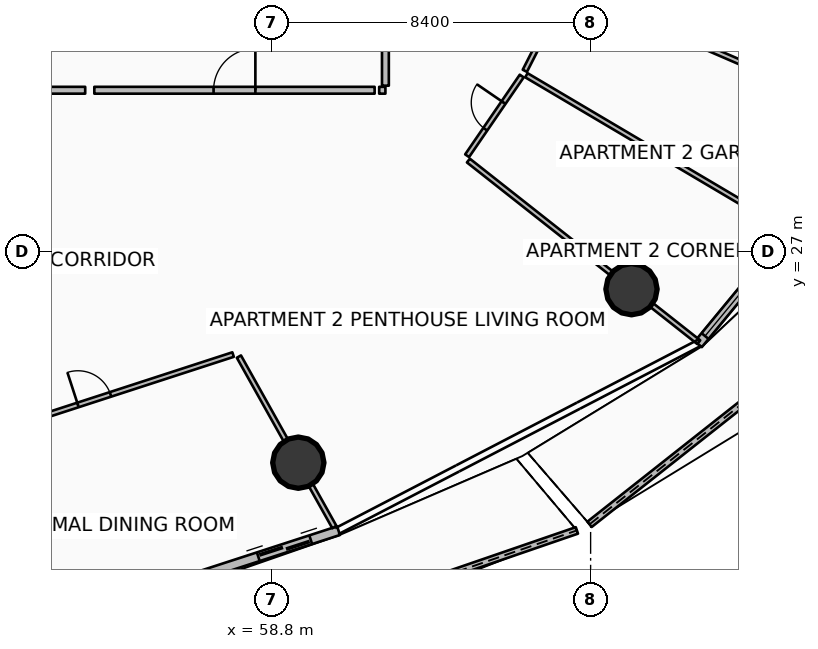
"""IFC4 building model, lengths in metres.
Left out: names, types, materials, properties, quantities, classifications, styles, units other than length and angle.
Written with IfcOpenShell. Run it as: python <this file> out.ifc"""

import sys

from ifc_helpers import new_model, si_unit, direction, frame, frame_2d, origin, origin_2d, place, context, subcontext, project, spatial, polyline, rectangle, circle, outline, extrude, element, fill, save


model = new_model("IFC4")
c1 = context("Model", 3, precision=1e-05, world=origin(), true_north=direction((0.0, 1.0)))
c2 = subcontext(c1, "Body", "Model", "MODEL_VIEW")
j1 = project(units=[si_unit("LENGTHUNIT", "METRE"), si_unit("PLANEANGLEUNIT", "RADIAN")], contexts=[c1])
p1 = place(None, origin())
s1 = spatial("IfcSite", under=j1, at=p1, CompositionType="ELEMENT")
p2 = place(p1, origin())
s2 = spatial("IfcBuilding", under=s1, at=p2, CompositionType="ELEMENT")
p3 = place(p2, frame((0.0, 0.0, 33.9)))
s3 = spatial("IfcBuildingStorey", under=s2, at=p3, CompositionType="ELEMENT", Elevation=33.9)
for number, where, z_axis, x_axis in (
    (1, (59.508, 21.45, 0.0), (0.0, 0.0, 1.0), (1.0, 0.0, 0.0)),
    (2, (68.276, 26.016, 0.0), (0.0, 0.0, 1.0), (1.0, 0.0, 0.0)),
):
    element("IfcColumn", number, at=place(p3, frame(where, z_axis=z_axis, x_axis=x_axis)), inside=s3, PredefinedType="COLUMN", context=c2, shape_type="SweptSolid", body=[
        extrude(circle(Radius=0.675, at=origin_2d()), origin(), (0.0, 0.0, 1.0), 3.5),
    ])
p4 = place(p3, frame((56.534, 16.122, 0.0), z_axis=(0.0, 0.0, 1.0), x_axis=(0.945564712315, 0.325434132851, 0.0)))
e3 = element("IfcWall", 3, at=p4, inside=s3, PredefinedType="PARAPET", context=c2, shape_type="SweptSolid", body=[
    extrude(outline(polyline([(0.0, 0.0), (10.897, 0.0), (10.897, 1.747), (5.448, 1.562), (0.0, 1.348), (0.0, 0.0)])), frame((0.0, 0.09, 0.0), z_axis=(0.0, -1.0, 0.0), x_axis=(1.0, 0.0, 0.0)), (0.0, 0.0, 1.0), 0.18),
])
p5 = place(p3, frame((67.172, 19.829, 0.0), z_axis=(0.0, 0.0, 1.0), x_axis=(0.784771193171, 0.619785587416, 0.0)))
e4 = element("IfcWall", 4, at=p5, inside=s3, PredefinedType="PARAPET", context=c2, shape_type="SweptSolid", body=[
    extrude(outline(polyline([(0.0, 0.0), (12.044, 0.0), (12.044, 1.832), (6.022, 1.853), (0.0, 1.756), (0.0, 0.0)])), frame((0.0, 0.09, 0.0), z_axis=(0.0, -1.0, 0.0), x_axis=(1.0, 0.0, 0.0)), (0.0, 0.0, 1.0), 0.18),
])
p6 = place(p3, frame((50.964, 16.542, 0.0), z_axis=(0.0, 0.0, 1.0), x_axis=(0.951054679225, 0.309022648238, 0.0)))
e5 = element("IfcWall", 5, at=p6, inside=s3, PredefinedType="SOLIDWALL", context=c2, shape_type="SweptSolid", body=[
    extrude(rectangle(XDim=10.097, YDim=0.24, at=frame_2d((5.048, 0.0))), origin(), (0.0, 0.0, 1.0), 2.45),
])
p7 = place(p6, frame((7.877, 0.0, 0.0)))
e6 = element("IfcOpeningElement", 6, at=p7, cuts=e5, PredefinedType="OPENING", context=c2, shape_type="SweptSolid", body=[
    extrude(rectangle(XDim=1.45, YDim=2.15, at=frame_2d((0.725, 1.075))), frame((0.0, 0.13, 0.0), z_axis=(0.0, -1.0, 0.0), x_axis=(1.0, 0.0, 0.0)), (0.0, 0.0, 1.0), 0.26),
])
p8 = place(p6, frame((0.28, 0.0, 0.65)))
e7 = element("IfcOpeningElement", 7, at=p8, cuts=e5, PredefinedType="OPENING", context=c2, shape_type="SweptSolid", body=[
    extrude(rectangle(XDim=1.6, YDim=1.5, at=frame_2d((0.8, 0.75))), frame((0.0, 0.13, 0.0), z_axis=(0.0, -1.0, 0.0), x_axis=(1.0, 0.0, 0.0)), (0.0, 0.0, 1.0), 0.26),
])
p9 = place(p3, frame((70.033, 24.567, 0.0), z_axis=(0.0, 0.0, 1.0), x_axis=(0.636674332663, 0.771132799281, 0.0)))
e8 = element("IfcWall", 8, at=p9, inside=s3, PredefinedType="SOLIDWALL", context=c2, shape_type="SweptSolid", body=[
    extrude(rectangle(XDim=11.851, YDim=0.24, at=frame_2d((5.926, 0.0))), origin(), (0.0, 0.0, 1.0), 2.45),
])
p10 = place(p9, frame((9.631, 0.0, 0.0)))
e9 = element("IfcOpeningElement", 9, at=p10, cuts=e8, PredefinedType="OPENING", context=c2, shape_type="SweptSolid", body=[
    extrude(rectangle(XDim=1.45, YDim=2.15, at=frame_2d((0.725, 1.075))), frame((0.0, 0.13, 0.0), z_axis=(0.0, -1.0, 0.0), x_axis=(1.0, 0.0, 0.0)), (0.0, 0.0, 1.0), 0.26),
])
p11 = place(p9, frame((0.28, 0.0, 0.65)))
e10 = element("IfcOpeningElement", 10, at=p11, cuts=e8, PredefinedType="OPENING", context=c2, shape_type="SweptSolid", body=[
    extrude(rectangle(XDim=1.6, YDim=1.5, at=frame_2d((0.8, 0.75))), frame((0.0, 0.13, 0.0), z_axis=(0.0, -1.0, 0.0), x_axis=(1.0, 0.0, 0.0)), (0.0, 0.0, 1.0), 0.26),
])
p12 = place(p3, frame((54.14, 31.25, 0.0), z_axis=(0.0, 0.0, 1.0), x_axis=(1.0, 0.0, 0.0)))
e11 = element("IfcWall", 11, at=p12, inside=s3, PredefinedType="PARTITIONING", context=c2, shape_type="SweptSolid", body=[
    extrude(rectangle(XDim=7.376, YDim=0.18, at=frame_2d((3.688, 0.0))), origin(), (0.0, 0.0, 1.0), 2.867),
])
p13 = place(p12, frame((3.138, 0.0, 0.0)))
e12 = element("IfcOpeningElement", 12, at=p13, cuts=e11, PredefinedType="OPENING", context=c2, shape_type="SweptSolid", body=[
    extrude(rectangle(XDim=1.1, YDim=2.1, at=frame_2d((0.55, 1.05))), frame((0.0, 0.1, 0.0), z_axis=(0.0, -1.0, 0.0), x_axis=(1.0, 0.0, 0.0)), (0.0, 0.0, 1.0), 0.2),
])
p14 = place(p3, frame((49.392, 31.25, 0.0), z_axis=(0.0, 0.0, 1.0), x_axis=(1.0, 0.0, 0.0)))
e13 = element("IfcWall", 13, at=p14, inside=s3, PredefinedType="PARTITIONING", context=c2, shape_type="SweptSolid", body=[
    extrude(rectangle(XDim=4.508, YDim=0.18, at=frame_2d((2.254, 0.0))), origin(), (0.0, 0.0, 1.0), 2.867),
])
p15 = place(p3, frame((57.945, 24.242, 0.0), z_axis=(0.0, 0.0, 1.0), x_axis=(0.488630834306, -0.872490634772, 0.0)))
e14 = element("IfcWall", 14, at=p15, inside=s3, PredefinedType="PARTITIONING", context=c2, shape_type="SweptSolid", body=[
    extrude(rectangle(XDim=5.143, YDim=0.125, at=frame_2d((2.571, 0.0))), origin(), (0.0, 0.0, 1.0), 2.867),
])
p16 = place(p3, frame((50.485, 21.921, 0.0), z_axis=(0.0, 0.0, 1.0), x_axis=(0.951055318468, 0.309020680883, 0.0)))
e15 = element("IfcWall", 15, at=p16, inside=s3, PredefinedType="PARTITIONING", context=c2, shape_type="SweptSolid", body=[
    extrude(rectangle(XDim=7.682, YDim=0.125, at=frame_2d((3.841, 0.0))), origin(), (0.0, 0.0, 1.0), 2.867),
])
p17 = place(p16, frame((3.391, 0.0, 0.0)))
e16 = element("IfcOpeningElement", 16, at=p17, cuts=e15, PredefinedType="OPENING", context=c2, shape_type="SweptSolid", body=[
    extrude(rectangle(XDim=0.9, YDim=2.08, at=frame_2d((0.45, 1.04))), frame((0.0, 0.073, 0.0), z_axis=(0.0, -1.0, 0.0), x_axis=(1.0, 0.0, 0.0)), (0.0, 0.0, 1.0), 0.145),
])
p18 = place(p3, frame((61.636, 31.25, 0.0), z_axis=(0.0, 0.0, 1.0), x_axis=(1.0, 0.0, 0.0)))
e17 = element("IfcWall", 17, at=p18, inside=s3, PredefinedType="PARTITIONING", context=c2, shape_type="SweptSolid", body=[
    extrude(rectangle(XDim=0.164, YDim=0.18, at=frame_2d((0.082, 0.0))), origin(), (0.0, 0.0, 1.0), 2.867),
])
p19 = place(p3, frame((61.8, 31.37, 0.0), z_axis=(0.0, 0.0, 1.0), x_axis=(0.0, 1.0, 0.0)))
e18 = element("IfcWall", 18, at=p19, inside=s3, PredefinedType="PARTITIONING", context=c2, shape_type="SweptSolid", body=[
    extrude(rectangle(XDim=6.618, YDim=0.18, at=frame_2d((3.309, 0.0))), origin(), (0.0, 0.0, 1.0), 2.867),
])
p20 = place(p3, frame((63.983, 29.4, 0.0), z_axis=(0.0, 0.0, 1.0), x_axis=(0.785322984339, -0.619086270457, 0.0)))
e19 = element("IfcWall", 19, at=p20, inside=s3, PredefinedType="PARTITIONING", context=c2, shape_type="SweptSolid", body=[
    extrude(rectangle(XDim=7.719, YDim=0.125, at=frame_2d((3.86, 0.0))), origin(), (0.0, 0.0, 1.0), 2.867),
])
p21 = place(p3, frame((65.51, 31.645, 0.0), z_axis=(0.0, 0.0, 1.0), x_axis=(0.86074163886, -0.509042072065, 0.0)))
e20 = element("IfcWall", 20, at=p21, inside=s3, PredefinedType="PARTITIONING", context=c2, shape_type="SweptSolid", body=[
    extrude(rectangle(XDim=7.968, YDim=0.125, at=frame_2d((3.984, 0.0))), origin(), (0.0, 0.0, 1.0), 2.94),
])
p22 = place(p3, frame((66.67, 33.921, 0.0), z_axis=(0.0, 0.0, 1.0), x_axis=(0.917747697885, -0.397163899451, 0.0)))
e21 = element("IfcWall", 21, at=p22, inside=s3, PredefinedType="PARTITIONING", context=c2, shape_type="SweptSolid", body=[
    extrude(rectangle(XDim=8.775, YDim=0.125, at=frame_2d((4.387, 0.0))), origin(), (0.0, 0.0, 1.0), 2.94),
])
p23 = place(p3, frame((63.95, 29.528, 0.0), z_axis=(0.0, 0.0, 1.0), x_axis=(0.565358509176, 0.824845292223, 0.0)))
e22 = element("IfcWall", 22, at=p23, inside=s3, PredefinedType="PARTITIONING", context=c2, shape_type="SweptSolid", body=[
    extrude(rectangle(XDim=2.542, YDim=0.125, at=frame_2d((1.271, 0.0))), origin(), (0.0, 0.0, 1.0), 2.867),
])
p24 = place(p23, frame((0.846, 0.0, 0.0)))
e23 = element("IfcOpeningElement", 23, at=p24, cuts=e22, PredefinedType="OPENING", context=c2, shape_type="SweptSolid", body=[
    extrude(rectangle(XDim=0.85, YDim=2.06, at=frame_2d((0.425, 1.03))), frame((0.0, 0.073, 0.0), z_axis=(0.0, -1.0, 0.0), x_axis=(1.0, 0.0, 0.0)), (0.0, 0.0, 1.0), 0.145),
])
p25 = place(p3, frame((65.469, 31.762, 0.0), z_axis=(0.0, 0.0, 1.0), x_axis=(0.45400250644, 0.891000406367, 0.0)))
e24 = element("IfcWall", 24, at=p25, inside=s3, PredefinedType="PARTITIONING", context=c2, shape_type="SweptSolid", body=[
    extrude(rectangle(XDim=2.383, YDim=0.125, at=frame_2d((1.192, 0.0))), origin(), (0.0, 0.0, 1.0), 2.94),
])
p26 = place(p25, frame((0.767, 0.0, 0.0)))
e25 = element("IfcOpeningElement", 25, at=p26, cuts=e24, PredefinedType="OPENING", context=c2, shape_type="SweptSolid", body=[
    extrude(rectangle(XDim=0.85, YDim=2.06, at=frame_2d((0.425, 1.03))), frame((0.0, 0.073, 0.0), z_axis=(0.0, -1.0, 0.0), x_axis=(1.0, 0.0, 0.0)), (0.0, 0.0, 1.0), 0.145),
])
p27 = place(p7, origin())
e26 = element("IfcDoor", 26, at=p27, inside=s3, OperationType="DOUBLE_DOOR_SLIDING", PredefinedType="DOOR", context=c2, shape_type="SweptSolid", body=[
    extrude(rectangle(XDim=1.45, YDim=2.15, at=frame_2d((0.725, 1.075))), frame((0.0, 0.025, 0.0), z_axis=(0.0, -1.0, 0.0), x_axis=(1.0, 0.0, 0.0)), (0.0, 0.0, 1.0), 0.05),
])
fill(e6, e26)
p28 = place(p11, origin())
e27 = element("IfcWindow", 27, at=p28, inside=s3, PartitioningType="SINGLE_PANEL", PredefinedType="WINDOW", context=c2, shape_type="SweptSolid", body=[
    extrude(rectangle(XDim=1.6, YDim=1.5, at=frame_2d((0.8, 0.75))), frame((0.0, 0.03, 0.0), z_axis=(0.0, -1.0, 0.0), x_axis=(1.0, 0.0, 0.0)), (0.0, 0.0, 1.0), 0.06),
])
fill(e10, e27)
p29 = place(p13, origin())
e28 = element("IfcDoor", 28, at=p29, inside=s3, OperationType="SINGLE_SWING_RIGHT", PredefinedType="DOOR", context=c2, shape_type="SweptSolid", body=[
    extrude(rectangle(XDim=1.1, YDim=2.1, at=frame_2d((0.55, 1.05))), frame((0.0, 0.025, 0.0), z_axis=(0.0, -1.0, 0.0), x_axis=(1.0, 0.0, 0.0)), (0.0, 0.0, 1.0), 0.05),
])
fill(e12, e28)
p30 = place(p17, origin())
e29 = element("IfcDoor", 29, at=p30, inside=s3, OperationType="SINGLE_SWING_LEFT", PredefinedType="DOOR", context=c2, shape_type="SweptSolid", body=[
    extrude(rectangle(XDim=0.9, YDim=2.08, at=frame_2d((0.45, 1.04))), frame((0.0, 0.025, 0.0), z_axis=(0.0, -1.0, 0.0), x_axis=(1.0, 0.0, 0.0)), (0.0, 0.0, 1.0), 0.05),
])
fill(e16, e29)
p31 = place(p24, origin())
e30 = element("IfcDoor", 30, at=p31, inside=s3, OperationType="SINGLE_SWING_RIGHT", PredefinedType="DOOR", context=c2, shape_type="SweptSolid", body=[
    extrude(rectangle(XDim=0.85, YDim=2.06, at=frame_2d((0.425, 1.03))), frame((0.0, 0.025, 0.0), z_axis=(0.0, -1.0, 0.0), x_axis=(1.0, 0.0, 0.0)), (0.0, 0.0, 1.0), 0.05),
])
fill(e23, e30)
save(model, sys.argv[1])
